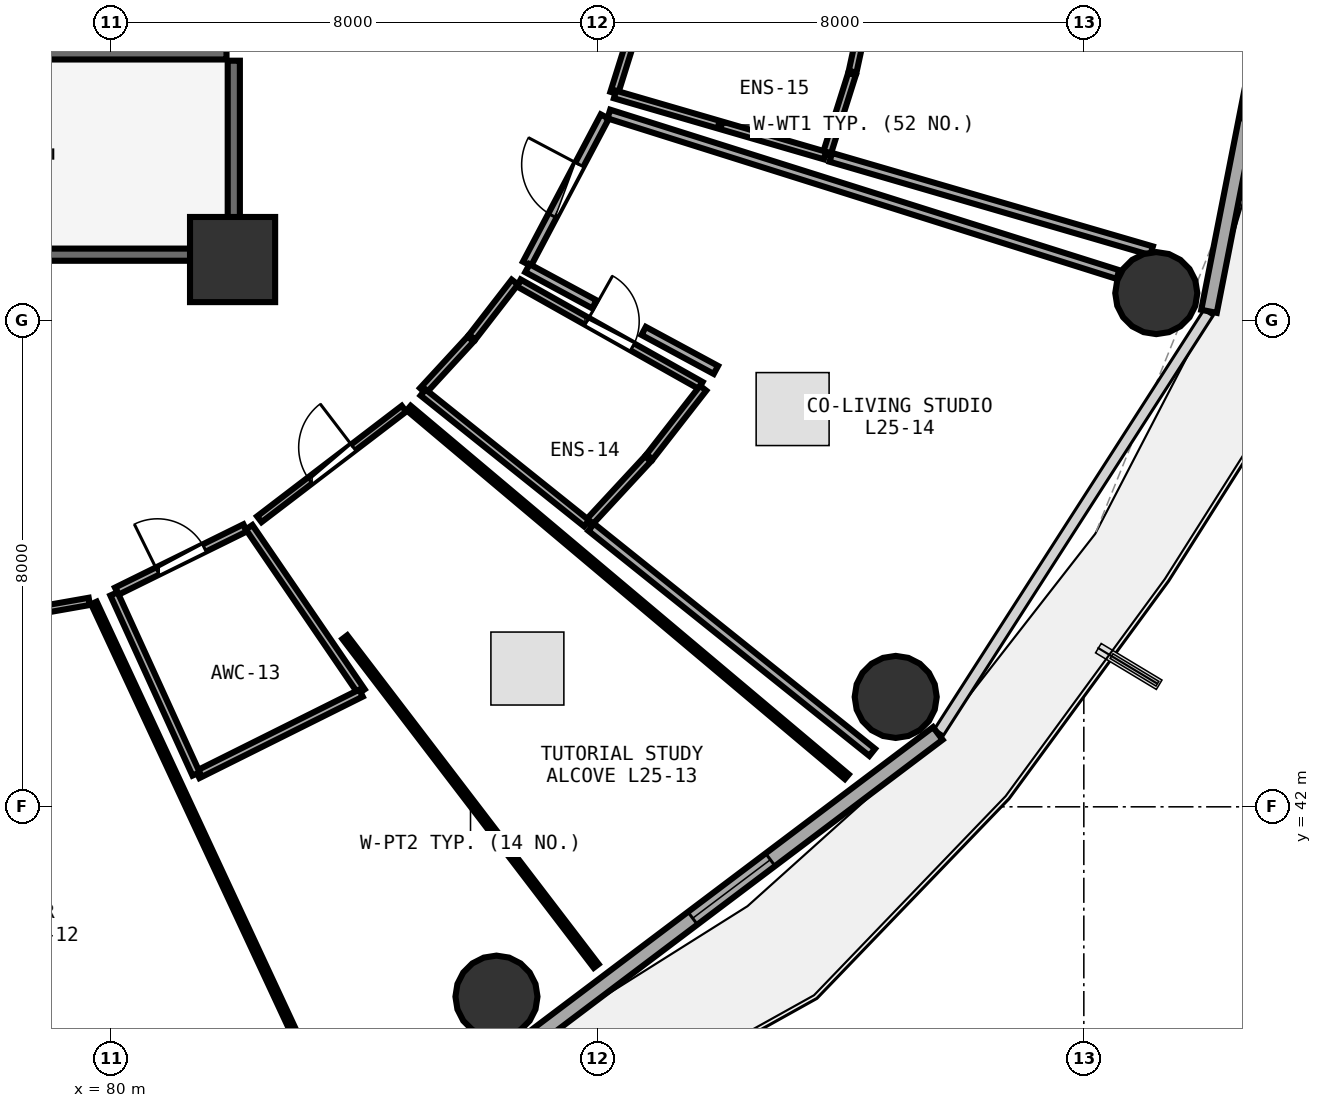
"""IFC4 building model, lengths in metres.
Left out: names, types, materials, properties, quantities, classifications, styles, units other than length and angle.
Written with IfcOpenShell. Run it as: python <this file> out.ifc"""

import sys

from ifc_helpers import new_model, si_unit, direction, frame, frame_2d, origin, origin_2d, place, context, subcontext, project, spatial, rectangle, circle, extrude, element, fill, save


model = new_model("IFC4")
c1 = context("Model", 3, precision=1e-05, world=origin(), true_north=direction((0.0, 1.0)))
c2 = subcontext(c1, "Body", "Model", "MODEL_VIEW")
j1 = project(units=[si_unit("LENGTHUNIT", "METRE"), si_unit("PLANEANGLEUNIT", "RADIAN")], contexts=[c1])
p1 = place(None, origin())
s1 = spatial("IfcSite", under=j1, at=p1, CompositionType="ELEMENT")
p2 = place(p1, origin())
s2 = spatial("IfcBuilding", under=s1, at=p2, CompositionType="ELEMENT")
p3 = place(p2, frame((0.0, 0.0, 98.85)))
s3 = spatial("IfcBuildingStorey", under=s2, at=p3, CompositionType="ELEMENT", Elevation=98.85)
p4 = place(p3, frame((82.0, 51.0, 0.0), z_axis=(0.0, 0.0, 1.0), x_axis=(1.0, 0.0, 0.0)))
e1 = element("IfcColumn", 1, at=p4, inside=s3, PredefinedType="PILASTER", context=c2, shape_type="SweptSolid", body=[
    extrude(rectangle(XDim=1.4, YDim=1.4, at=origin_2d()), origin(), (0.0, 0.0, 1.0), 3.75),
])
for number, where, z_axis, x_axis in (
    (2, (86.34, 38.878, 0.0), (0.0, 0.0, 1.0), (1.0, 0.0, 0.0)),
    (3, (92.906, 43.807, 0.0), (0.0, 0.0, 1.0), (1.0, 0.0, 0.0)),
    (4, (97.192, 50.448, 0.0), (0.0, 0.0, 1.0), (1.0, 0.0, 0.0)),
):
    element("IfcColumn", number, at=place(p3, frame(where, z_axis=z_axis, x_axis=x_axis)), inside=s3, PredefinedType="COLUMN", context=c2, shape_type="SweptSolid", body=[
        extrude(circle(Radius=0.675, at=origin_2d()), origin(), (0.0, 0.0, 1.0), 3.75),
    ])
p5 = place(p3, frame((86.812, 38.09, 0.0), z_axis=(0.0, 0.0, 1.0), x_axis=(0.798501507879, 0.601992808857, 0.0)))
e5 = element("IfcWall", 5, at=p5, inside=s3, PredefinedType="SOLIDWALL", context=c2, shape_type="SweptSolid", body=[
    extrude(rectangle(XDim=8.499, YDim=0.26, at=frame_2d((4.25, 0.0))), origin(), (0.0, 0.0, 1.0), 3.475),
])
p6 = place(p5, frame((3.45, 0.0, 0.85)))
e6 = element("IfcOpeningElement", 6, at=p6, cuts=e5, PredefinedType="OPENING", context=c2, shape_type="SweptSolid", body=[
    extrude(rectangle(XDim=1.6, YDim=1.45, at=frame_2d((0.8, 0.725))), frame((0.0, 0.14, 0.0), z_axis=(0.0, -1.0, 0.0), x_axis=(1.0, 0.0, 0.0)), (0.0, 0.0, 1.0), 0.28),
])
p7 = place(p3, frame((98.059, 50.148, 0.0), z_axis=(0.0, 0.0, 1.0), x_axis=(0.192581843632, 0.981280914674, 0.0)))
e7 = element("IfcWall", 7, at=p7, inside=s3, PredefinedType="SOLIDWALL", context=c2, shape_type="SweptSolid", body=[
    extrude(rectangle(XDim=7.987, YDim=0.26, at=frame_2d((3.993, 0.0))), origin(), (0.0, 0.0, 1.0), 3.475),
])
p8 = place(p7, frame((3.193, 0.0, 0.85)))
e8 = element("IfcOpeningElement", 8, at=p8, cuts=e7, PredefinedType="OPENING", context=c2, shape_type="SweptSolid", body=[
    extrude(rectangle(XDim=1.6, YDim=1.45, at=frame_2d((0.8, 0.725))), frame((0.0, 0.14, 0.0), z_axis=(0.0, -1.0, 0.0), x_axis=(1.0, 0.0, 0.0)), (0.0, 0.0, 1.0), 0.28),
])
p9 = place(p3, frame((74.0, 51.08, 0.0), z_axis=(0.0, 0.0, 1.0), x_axis=(1.0, 0.0, 0.0)))
e9 = element("IfcWall", 9, at=p9, inside=s3, PredefinedType="SHEAR", context=c2, shape_type="SweptSolid", body=[
    extrude(rectangle(XDim=7.9, YDim=0.2, at=frame_2d((3.95, 0.0))), origin(), (0.0, 0.0, 1.0), 3.49),
])
p10 = place(p9, frame((1.12, 0.0, 0.0)))
e10 = element("IfcOpeningElement", 10, at=p10, cuts=e9, PredefinedType="OPENING", context=c2, shape_type="SweptSolid", body=[
    extrude(rectangle(XDim=1.05, YDim=2.1, at=frame_2d((0.525, 1.05))), frame((0.0, 0.11, 0.0), z_axis=(0.0, -1.0, 0.0), x_axis=(1.0, 0.0, 0.0)), (0.0, 0.0, 1.0), 0.22),
])
p11 = place(p3, frame((82.02, 51.2, 0.0), z_axis=(0.0, 0.0, 1.0), x_axis=(0.0, 1.0, 0.0)))
e11 = element("IfcWall", 11, at=p11, inside=s3, PredefinedType="SHEAR", context=c2, shape_type="SweptSolid", body=[
    extrude(rectangle(XDim=3.07, YDim=0.2, at=frame_2d((1.535, 0.0))), origin(), (0.0, 0.0, 1.0), 3.49),
])
p12 = place(p3, frame((81.9, 54.39, 0.0), z_axis=(0.0, 0.0, 1.0), x_axis=(-1.0, 0.0, 0.0)))
e12 = element("IfcWall", 12, at=p12, inside=s3, PredefinedType="SHEAR", context=c2, shape_type="SweptSolid", body=[
    extrude(rectangle(XDim=8.46, YDim=0.2, at=frame_2d((4.23, 0.0))), origin(), (0.0, 0.0, 1.0), 3.49),
])
p13 = place(p3, frame((73.98, 44.38, 0.0), z_axis=(0.0, 0.0, 1.0), x_axis=(0.984819435921, 0.17358190756, 0.0)))
e13 = element("IfcWall", 13, at=p13, inside=s3, PredefinedType="PARTITIONING", context=c2, shape_type="SweptSolid", body=[
    extrude(rectangle(XDim=5.751, YDim=0.12, at=frame_2d((2.875, 0.0))), origin(), (0.0, 0.0, 1.0), 3.235),
])
p14 = place(p13, frame((2.426, 0.0, 0.0)))
e14 = element("IfcOpeningElement", 14, at=p14, cuts=e13, PredefinedType="OPENING", context=c2, shape_type="SweptSolid", body=[
    extrude(rectangle(XDim=0.9, YDim=2.08, at=frame_2d((0.45, 1.04))), frame((0.0, 0.07, 0.0), z_axis=(0.0, -1.0, 0.0), x_axis=(1.0, 0.0, 0.0)), (0.0, 0.0, 1.0), 0.14),
])
p15 = place(p3, frame((80.095, 45.546, 0.0), z_axis=(0.0, 0.0, 1.0), x_axis=(0.897003770221, 0.442022891046, 0.0)))
e15 = element("IfcWall", 15, at=p15, inside=s3, PredefinedType="PLUMBINGWALL", context=c2, shape_type="SweptSolid", body=[
    extrude(rectangle(XDim=2.355, YDim=0.13, at=frame_2d((1.178, 0.0))), origin(), (0.0, 0.0, 1.0), 2.925),
])
p16 = place(p15, frame((0.747, 0.0, 0.0)))
e16 = element("IfcOpeningElement", 16, at=p16, cuts=e15, PredefinedType="OPENING", context=c2, shape_type="SweptSolid", body=[
    extrude(rectangle(XDim=0.86, YDim=2.05, at=frame_2d((0.43, 1.025))), frame((0.0, 0.075, 0.0), z_axis=(0.0, -1.0, 0.0), x_axis=(1.0, 0.0, 0.0)), (0.0, 0.0, 1.0), 0.15),
])
p17 = place(p3, frame((82.44, 46.729, 0.0), z_axis=(0.0, 0.0, 1.0), x_axis=(0.794654066843, 0.607062528945, 0.0)))
e17 = element("IfcWall", 17, at=p17, inside=s3, PredefinedType="PARTITIONING", context=c2, shape_type="SweptSolid", body=[
    extrude(rectangle(XDim=2.993, YDim=0.12, at=frame_2d((1.497, 0.0))), origin(), (0.0, 0.0, 1.0), 2.925),
])
p18 = place(p17, frame((1.047, 0.0, 0.0)))
e18 = element("IfcOpeningElement", 18, at=p18, cuts=e17, PredefinedType="OPENING", context=c2, shape_type="SweptSolid", body=[
    extrude(rectangle(XDim=0.9, YDim=2.08, at=frame_2d((0.45, 1.04))), frame((0.0, 0.07, 0.0), z_axis=(0.0, -1.0, 0.0), x_axis=(1.0, 0.0, 0.0)), (0.0, 0.0, 1.0), 0.14),
])
p19 = place(p3, frame((86.706, 50.615, 0.0), z_axis=(0.0, 0.0, 1.0), x_axis=(0.871227933134, -0.490878690236, 0.0)))
e19 = element("IfcWall", 19, at=p19, inside=s3, PredefinedType="PLUMBINGWALL", context=c2, shape_type="SweptSolid", body=[
    extrude(rectangle(XDim=3.435, YDim=0.13, at=frame_2d((1.717, 0.0))), origin(), (0.0, 0.0, 1.0), 3.235),
])
p20 = place(p19, frame((1.287, 0.0, 0.0)))
e20 = element("IfcOpeningElement", 20, at=p20, cuts=e19, PredefinedType="OPENING", context=c2, shape_type="SweptSolid", body=[
    extrude(rectangle(XDim=0.86, YDim=2.05, at=frame_2d((0.43, 1.025))), frame((0.0, 0.075, 0.0), z_axis=(0.0, -1.0, 0.0), x_axis=(1.0, 0.0, 0.0)), (0.0, 0.0, 1.0), 0.15),
])
p21 = place(p3, frame((86.842, 50.93, 0.0), z_axis=(0.0, 0.0, 1.0), x_axis=(0.467240653506, 0.884130178034, 0.0)))
e21 = element("IfcWall", 21, at=p21, inside=s3, PredefinedType="PARTITIONING", context=c2, shape_type="SweptSolid", body=[
    extrude(rectangle(XDim=2.74, YDim=0.15, at=frame_2d((1.37, 0.0))), origin(), (0.0, 0.0, 1.0), 2.925),
])
p22 = place(p21, frame((0.895, 0.0, 0.0)))
e22 = element("IfcOpeningElement", 22, at=p22, cuts=e21, PredefinedType="OPENING", context=c2, shape_type="SweptSolid", body=[
    extrude(rectangle(XDim=0.95, YDim=2.08, at=frame_2d((0.475, 1.04))), frame((0.0, 0.085, 0.0), z_axis=(0.0, -1.0, 0.0), x_axis=(1.0, 0.0, 0.0)), (0.0, 0.0, 1.0), 0.17),
])
p23 = place(p3, frame((79.72, 45.353, 0.0), z_axis=(0.0, 0.0, 1.0), x_axis=(0.422225492456, -0.906490834769, 0.0)))
e23 = element("IfcWall", 23, at=p23, inside=s3, PredefinedType="PARTITIONING", context=c2, shape_type="SweptSolid", body=[
    extrude(rectangle(XDim=8.953, YDim=0.1, at=frame_2d((4.476, 0.0))), origin(), (0.0, 0.0, 1.0), 2.925),
])
p24 = place(p3, frame((82.272, 46.597, 0.0), z_axis=(0.0, 0.0, 1.0), x_axis=(0.56421847533, -0.825625527764, 0.0)))
e24 = element("IfcWall", 24, at=p24, inside=s3, PredefinedType="PLUMBINGWALL", context=c2, shape_type="SweptSolid", body=[
    extrude(rectangle(XDim=3.272, YDim=0.13, at=frame_2d((1.636, 0.0))), origin(), (0.0, 0.0, 1.0), 3.235),
])
p25 = place(p3, frame((84.112, 43.87, 0.0), z_axis=(0.0, 0.0, 1.0), x_axis=(-0.89496337821, -0.446139610059, 0.0)))
e25 = element("IfcWall", 25, at=p25, inside=s3, PredefinedType="PLUMBINGWALL", context=c2, shape_type="SweptSolid", body=[
    extrude(rectangle(XDim=3.001, YDim=0.13, at=frame_2d((1.501, 0.0))), origin(), (0.0, 0.0, 1.0), 3.175),
])
p26 = place(p3, frame((81.4, 42.54, 0.0), z_axis=(0.0, 0.0, 1.0), x_axis=(-0.414882082756, 0.909875187819, 0.0)))
e26 = element("IfcWall", 26, at=p26, inside=s3, PredefinedType="PLUMBINGWALL", context=c2, shape_type="SweptSolid", body=[
    extrude(rectangle(XDim=3.255, YDim=0.13, at=frame_2d((1.627, 0.0))), origin(), (0.0, 0.0, 1.0), 2.925),
])
p27 = place(p3, frame((84.896, 48.557, 0.0), z_axis=(0.0, 0.0, 1.0), x_axis=(0.765171343651, -0.64382669629, 0.0)))
e27 = element("IfcWall", 27, at=p27, inside=s3, PredefinedType="PARTITIONING", context=c2, shape_type="SweptSolid", body=[
    extrude(rectangle(XDim=9.416, YDim=0.1, at=frame_2d((4.708, 0.0))), origin(), (0.0, 0.0, 1.0), 2.975),
])
p28 = place(p3, frame((87.98, 39.383, 0.0), z_axis=(0.0, 0.0, 1.0), x_axis=(-0.607281003039, 0.794487119687, 0.0)))
e28 = element("IfcWall", 28, at=p28, inside=s3, PredefinedType="PARTITIONING", context=c2, shape_type="SweptSolid", body=[
    extrude(rectangle(XDim=6.806, YDim=0.1, at=frame_2d((3.403, 0.0))), origin(), (0.0, 0.0, 1.0), 2.925),
])
p29 = place(p3, frame((85.131, 48.842, 0.0), z_axis=(0.0, 0.0, 1.0), x_axis=(0.677595961293, 0.73543437045, 0.0)))
e29 = element("IfcWall", 29, at=p29, inside=s3, PredefinedType="PLUMBINGWALL", context=c2, shape_type="SweptSolid", body=[
    extrude(rectangle(XDim=1.156, YDim=0.13, at=frame_2d((0.578, 0.0))), origin(), (0.0, 0.0, 1.0), 2.925),
])
p30 = place(p3, frame((85.94, 49.723, 0.0), z_axis=(0.0, 0.0, 1.0), x_axis=(0.61219897041, 0.790703750231, 0.0)))
e30 = element("IfcWall", 30, at=p30, inside=s3, PredefinedType="PLUMBINGWALL", context=c2, shape_type="SweptSolid", body=[
    extrude(rectangle(XDim=1.146, YDim=0.13, at=frame_2d((0.573, 0.0))), origin(), (0.0, 0.0, 1.0), 3.48),
])
p31 = place(p3, frame((89.739, 48.884, 0.0), z_axis=(0.0, 0.0, 1.0), x_axis=(-0.614790089133, -0.788690779903, 0.0)))
e31 = element("IfcWall", 31, at=p31, inside=s3, PredefinedType="PLUMBINGWALL", context=c2, shape_type="SweptSolid", body=[
    extrude(rectangle(XDim=1.432, YDim=0.13, at=frame_2d((0.716, 0.0))), origin(), (0.0, 0.0, 1.0), 3.48),
])
p32 = place(p3, frame((88.833, 47.724, 0.0), z_axis=(0.0, 0.0, 1.0), x_axis=(-0.679724752717, -0.733467286621, 0.0)))
e32 = element("IfcWall", 32, at=p32, inside=s3, PredefinedType="PLUMBINGWALL", context=c2, shape_type="SweptSolid", body=[
    extrude(rectangle(XDim=1.445, YDim=0.13, at=frame_2d((0.722, 0.0))), origin(), (0.0, 0.0, 1.0), 2.925),
])
p33 = place(p3, frame((87.821, 46.663, 0.0), z_axis=(0.0, 0.0, 1.0), x_axis=(-0.780744298962, 0.624850653868, 0.0)))
e33 = element("IfcWall", 33, at=p33, inside=s3, PredefinedType="PLUMBINGWALL", context=c2, shape_type="SweptSolid", body=[
    extrude(rectangle(XDim=3.444, YDim=0.13, at=frame_2d((1.722, 0.0))), origin(), (0.0, 0.0, 1.0), 2.925),
])
p34 = place(p3, frame((88.188, 53.393, 0.0), z_axis=(0.0, 0.0, 1.0), x_axis=(0.95372586497, -0.300677525743, 0.0)))
e34 = element("IfcWall", 34, at=p34, inside=s3, PredefinedType="PARTITIONING", context=c2, shape_type="SweptSolid", body=[
    extrude(rectangle(XDim=8.78, YDim=0.15, at=frame_2d((4.39, 0.0))), origin(), (0.0, 0.0, 1.0), 3.175),
])
p35 = place(p3, frame((92.519, 42.896, 0.0), z_axis=(0.0, 0.0, 1.0), x_axis=(-0.780422060226, 0.625253075093, 0.0)))
e35 = element("IfcWall", 35, at=p35, inside=s3, PredefinedType="PARTITIONING", context=c2, shape_type="SweptSolid", body=[
    extrude(rectangle(XDim=5.921, YDim=0.15, at=frame_2d((2.96, 0.0))), origin(), (0.0, 0.0, 1.0), 2.975),
])
p36 = place(p3, frame((89.949, 49.185, 0.0), z_axis=(0.0, 0.0, 1.0), x_axis=(-0.879994582466, 0.474983720595, 0.0)))
e36 = element("IfcWall", 36, at=p36, inside=s3, PredefinedType="PARTITIONING", context=c2, shape_type="SweptSolid", body=[
    extrude(rectangle(XDim=1.35, YDim=0.15, at=frame_2d((0.675, 0.0))), origin(), (0.0, 0.0, 1.0), 3.175),
])
p37 = place(p3, frame((87.951, 50.263, 0.0), z_axis=(0.0, 0.0, 1.0), x_axis=(-0.880026054437, 0.474925408367, 0.0)))
e37 = element("IfcWall", 37, at=p37, inside=s3, PredefinedType="PARTITIONING", context=c2, shape_type="SweptSolid", body=[
    extrude(rectangle(XDim=1.252, YDim=0.15, at=frame_2d((0.626, 0.0))), origin(), (0.0, 0.0, 1.0), 2.925),
])
p38 = place(p3, frame((88.276, 53.739, 0.0), z_axis=(0.0, 0.0, 1.0), x_axis=(0.299445496357, 0.954113407678, 0.0)))
e38 = element("IfcWall", 38, at=p38, inside=s3, PredefinedType="PLUMBINGWALL", context=c2, shape_type="SweptSolid", body=[
    extrude(rectangle(XDim=1.116, YDim=0.13, at=frame_2d((0.558, 0.0))), origin(), (0.0, 0.0, 1.0), 3.48),
])
p39 = place(p3, frame((92.491, 55.442, 0.0), z_axis=(0.0, 0.0, 1.0), x_axis=(-0.211815062924, -0.977309766204, 0.0)))
e39 = element("IfcWall", 39, at=p39, inside=s3, PredefinedType="PLUMBINGWALL", context=c2, shape_type="SweptSolid", body=[
    extrude(rectangle(XDim=1.385, YDim=0.13, at=frame_2d((0.693, 0.0))), origin(), (0.0, 0.0, 1.0), 3.48),
])
p40 = place(p3, frame((92.187, 54.05, 0.0), z_axis=(0.0, 0.0, 1.0), x_axis=(-0.301333060242, -0.953518949369, 0.0)))
e40 = element("IfcWall", 40, at=p40, inside=s3, PredefinedType="PLUMBINGWALL", context=c2, shape_type="SweptSolid", body=[
    extrude(rectangle(XDim=1.39, YDim=0.13, at=frame_2d((0.695, 0.0))), origin(), (0.0, 0.0, 1.0), 3.48),
])
p41 = place(p3, frame((91.743, 52.711, 0.0), z_axis=(0.0, 0.0, 1.0), x_axis=(-0.960271729766, 0.279066667685, 0.0)))
e41 = element("IfcWall", 41, at=p41, inside=s3, PredefinedType="PLUMBINGWALL", context=c2, shape_type="SweptSolid", body=[
    extrude(rectangle(XDim=3.596, YDim=0.13, at=frame_2d((1.798, 0.0))), origin(), (0.0, 0.0, 1.0), 3.175),
])
p42 = place(p3, frame((97.115, 51.144, 0.0), z_axis=(0.0, 0.0, 1.0), x_axis=(-0.960104911934, 0.279640050924, 0.0)))
e42 = element("IfcWall", 42, at=p42, inside=s3, PredefinedType="PARTITIONING", context=c2, shape_type="SweptSolid", body=[
    extrude(rectangle(XDim=5.496, YDim=0.15, at=frame_2d((2.748, 0.0))), origin(), (0.0, 0.0, 1.0), 2.975),
])
p43 = place(p6, origin())
e43 = element("IfcWindow", 43, at=p43, inside=s3, PartitioningType="SINGLE_PANEL", PredefinedType="WINDOW", context=c2, shape_type="SweptSolid", body=[
    extrude(rectangle(XDim=1.6, YDim=1.45, at=frame_2d((0.8, 0.725))), frame((0.0, 0.03, 0.0), z_axis=(0.0, -1.0, 0.0), x_axis=(1.0, 0.0, 0.0)), (0.0, 0.0, 1.0), 0.06),
])
fill(e6, e43)
p44 = place(p16, origin())
e44 = element("IfcDoor", 44, at=p44, inside=s3, OperationType="SINGLE_SWING_LEFT", PredefinedType="DOOR", context=c2, shape_type="SweptSolid", body=[
    extrude(rectangle(XDim=0.86, YDim=2.05, at=frame_2d((0.43, 1.025))), frame((0.0, 0.025, 0.0), z_axis=(0.0, -1.0, 0.0), x_axis=(1.0, 0.0, 0.0)), (0.0, 0.0, 1.0), 0.05),
])
fill(e16, e44)
p45 = place(p18, origin())
e45 = element("IfcDoor", 45, at=p45, inside=s3, OperationType="SINGLE_SWING_RIGHT", PredefinedType="DOOR", context=c2, shape_type="SweptSolid", body=[
    extrude(rectangle(XDim=0.9, YDim=2.08, at=frame_2d((0.45, 1.04))), frame((0.0, 0.025, 0.0), z_axis=(0.0, -1.0, 0.0), x_axis=(1.0, 0.0, 0.0)), (0.0, 0.0, 1.0), 0.05),
])
fill(e18, e45)
p46 = place(p20, origin())
e46 = element("IfcDoor", 46, at=p46, inside=s3, OperationType="SINGLE_SWING_LEFT", PredefinedType="DOOR", context=c2, shape_type="SweptSolid", body=[
    extrude(rectangle(XDim=0.86, YDim=2.05, at=frame_2d((0.43, 1.025))), frame((0.0, 0.025, 0.0), z_axis=(0.0, -1.0, 0.0), x_axis=(1.0, 0.0, 0.0)), (0.0, 0.0, 1.0), 0.05),
])
fill(e20, e46)
p47 = place(p22, origin())
e47 = element("IfcDoor", 47, at=p47, inside=s3, OperationType="SINGLE_SWING_RIGHT", PredefinedType="DOOR", context=c2, shape_type="SweptSolid", body=[
    extrude(rectangle(XDim=0.95, YDim=2.08, at=frame_2d((0.475, 1.04))), frame((0.0, 0.025, 0.0), z_axis=(0.0, -1.0, 0.0), x_axis=(1.0, 0.0, 0.0)), (0.0, 0.0, 1.0), 0.05),
])
fill(e22, e47)
save(model, sys.argv[1])
